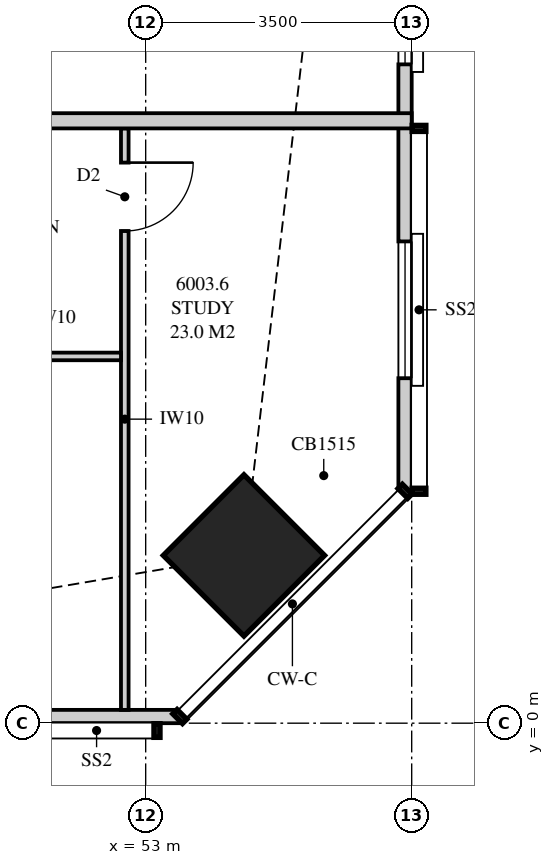
"""IFC4 building model, lengths in metres.
Left out: names, types, materials, properties, quantities, classifications, styles, units other than length and angle.
Written with IfcOpenShell. Run it as: python <this file> out.ifc"""

import sys

from ifc_helpers import new_model, si_unit, direction, frame, frame_2d, origin, origin_2d, place, context, subcontext, project, spatial, polyline, rectangle, hollow_rectangle, outline, extrude, element, fill, save


model = new_model("IFC4")
c1 = context("Model", 3, precision=1e-05, world=origin(), true_north=direction((0.0, 1.0)))
c2 = subcontext(c1, "Body", "Model", "MODEL_VIEW")
j1 = project(units=[si_unit("LENGTHUNIT", "METRE"), si_unit("PLANEANGLEUNIT", "RADIAN")], contexts=[c1])
p1 = place(None, origin())
s1 = spatial("IfcSite", under=j1, at=p1, CompositionType="ELEMENT")
p2 = place(p1, origin())
s2 = spatial("IfcBuilding", under=s1, at=p2, CompositionType="ELEMENT")
p3 = place(p2, frame((0.0, 0.0, 221.45)))
s3 = spatial("IfcBuildingStorey", under=s2, at=p3, CompositionType="ELEMENT", Elevation=221.45)
p4 = place(p3, frame((54.293, 2.207, 0.0), z_axis=(0.0, 0.0, 1.0), x_axis=(-0.707106781187, 0.707106781187, 0.0)))
e1 = element("IfcColumn", 1, at=p4, inside=s3, PredefinedType="COLUMN", context=c2, shape_type="SweptSolid", body=[
    extrude(hollow_rectangle(XDim=1.5, YDim=1.5, WallThickness=0.125, at=origin_2d()), origin(), (0.0, 0.0, 1.0), 3.5),
])
p5 = place(p3, frame((35.35, 0.087, 0.0), z_axis=(0.0, 0.0, 1.0), x_axis=(1.0, 0.0, 0.0)))
e2 = element("IfcWall", 2, at=p5, inside=s3, PredefinedType="SOLIDWALL", context=c2, shape_type="SweptSolid", body=[
    extrude(outline(polyline([(0.0, 0.0), (18.099, 0.0), (18.099, 3.26), (11.74, 3.26), (11.74, 2.3), (11.656, 2.3), (11.656, 3.26), (11.525, 3.26), (11.525, 2.3), (0.0, 2.3), (0.0, 0.0)])), frame((0.0, 0.087, 0.0), z_axis=(0.0, -1.0, 0.0), x_axis=(1.0, 0.0, 0.0)), (0.0, 0.0, 1.0), 0.175),
])
p6 = place(p5, frame((4.0, 0.0, 0.4)))
e3 = element("IfcOpeningElement", 3, at=p6, cuts=e2, PredefinedType="OPENING", context=c2, shape_type="SweptSolid", body=[
    extrude(rectangle(XDim=1.8, YDim=1.85, at=frame_2d((0.9, 0.925))), frame((0.0, 0.097, 0.0), z_axis=(0.0, -1.0, 0.0), x_axis=(1.0, 0.0, 0.0)), (0.0, 0.0, 1.0), 0.195),
])
p7 = place(p5, frame((7.6, 0.0, 0.4)))
e4 = element("IfcOpeningElement", 4, at=p7, cuts=e2, PredefinedType="OPENING", context=c2, shape_type="SweptSolid", body=[
    extrude(rectangle(XDim=1.8, YDim=1.85, at=frame_2d((0.9, 0.925))), frame((0.0, 0.097, 0.0), z_axis=(0.0, -1.0, 0.0), x_axis=(1.0, 0.0, 0.0)), (0.0, 0.0, 1.0), 0.195),
])
p8 = place(p5, frame((13.51, 0.0, 0.4)))
e5 = element("IfcOpeningElement", 5, at=p8, cuts=e2, PredefinedType="OPENING", context=c2, shape_type="SweptSolid", body=[
    extrude(rectangle(XDim=2.4, YDim=1.85, at=frame_2d((1.2, 0.925))), frame((0.0, 0.097, 0.0), z_axis=(0.0, -1.0, 0.0), x_axis=(1.0, 0.0, 0.0)), (0.0, 0.0, 1.0), 0.195),
])
p9 = place(p3, frame((56.413, 3.051, 0.0), z_axis=(0.0, 0.0, 1.0), x_axis=(0.0, 1.0, 0.0)))
e6 = element("IfcWall", 6, at=p9, inside=s3, PredefinedType="SOLIDWALL", context=c2, shape_type="SweptSolid", body=[
    extrude(outline(polyline([(0.0, 0.0), (14.249, 0.0), (14.249, 2.3), (9.949, 2.3), (9.949, 3.26), (9.858, 3.26), (9.858, 2.3), (9.688, 2.3), (9.688, 3.26), (0.0, 3.26), (0.0, 0.0)])), frame((0.0, 0.087, 0.0), z_axis=(0.0, -1.0, 0.0), x_axis=(1.0, 0.0, 0.0)), (0.0, 0.0, 1.0), 0.175),
])
p10 = place(p9, frame((1.487, 0.0, 0.4)))
e7 = element("IfcOpeningElement", 7, at=p10, cuts=e6, PredefinedType="OPENING", context=c2, shape_type="SweptSolid", body=[
    extrude(rectangle(XDim=1.8, YDim=1.85, at=frame_2d((0.9, 0.925))), frame((0.0, 0.097, 0.0), z_axis=(0.0, -1.0, 0.0), x_axis=(1.0, 0.0, 0.0)), (0.0, 0.0, 1.0), 0.195),
])
p11 = place(p9, frame((5.616, 0.0, 0.4)))
e8 = element("IfcOpeningElement", 8, at=p11, cuts=e6, PredefinedType="OPENING", context=c2, shape_type="SweptSolid", body=[
    extrude(rectangle(XDim=2.4, YDim=1.85, at=frame_2d((1.2, 0.925))), frame((0.0, 0.097, 0.0), z_axis=(0.0, -1.0, 0.0), x_axis=(1.0, 0.0, 0.0)), (0.0, 0.0, 1.0), 0.195),
])
p12 = place(p9, frame((11.875, 0.0, 0.4)))
e9 = element("IfcOpeningElement", 9, at=p12, cuts=e6, PredefinedType="OPENING", context=c2, shape_type="SweptSolid", body=[
    extrude(rectangle(XDim=1.8, YDim=1.85, at=frame_2d((0.9, 0.925))), frame((0.0, 0.097, 0.0), z_axis=(0.0, -1.0, 0.0), x_axis=(1.0, 0.0, 0.0)), (0.0, 0.0, 1.0), 0.195),
])
p13 = place(p3, frame((52.725, 0.175, 0.0), z_axis=(0.0, 0.0, 1.0), x_axis=(0.0, 1.0, 0.0)))
e10 = element("IfcWall", 10, at=p13, inside=s3, PredefinedType="PARTITIONING", context=c2, shape_type="SweptSolid", body=[
    extrude(outline(polyline([(0.0, 0.0), (7.65, 0.0), (7.65, 3.26), (2.639, 3.26), (2.639, 2.3), (0.894, 2.3), (0.894, 3.26), (0.0, 3.26), (0.0, 0.0)])), frame((0.0, 0.05, 0.0), z_axis=(0.0, -1.0, 0.0), x_axis=(1.0, 0.0, 0.0)), (0.0, 0.0, 1.0), 0.1),
])
p14 = place(p13, frame((6.3, 0.0, 0.0)))
e11 = element("IfcOpeningElement", 11, at=p14, cuts=e10, PredefinedType="OPENING", context=c2, shape_type="SweptSolid", body=[
    extrude(rectangle(XDim=0.9, YDim=2.1, at=frame_2d((0.45, 1.05))), frame((0.0, 0.06, 0.0), z_axis=(0.0, -1.0, 0.0), x_axis=(1.0, 0.0, 0.0)), (0.0, 0.0, 1.0), 0.12),
])
p15 = place(p3, frame((49.175, 4.825, 0.0), z_axis=(0.0, 0.0, 1.0), x_axis=(1.0, 0.0, 0.0)))
e12 = element("IfcWall", 12, at=p15, inside=s3, PredefinedType="PARTITIONING", context=c2, shape_type="SweptSolid", body=[
    extrude(rectangle(XDim=3.5, YDim=0.1, at=frame_2d((1.75, 0.0))), origin(), (0.0, 0.0, 1.0), 3.26),
])
p16 = place(p15, frame((1.3, 0.0, 0.0)))
e13 = element("IfcOpeningElement", 13, at=p16, cuts=e12, PredefinedType="OPENING", context=c2, shape_type="SweptSolid", body=[
    extrude(rectangle(XDim=0.9, YDim=2.1, at=frame_2d((0.45, 1.05))), frame((0.0, 0.06, 0.0), z_axis=(0.0, -1.0, 0.0), x_axis=(1.0, 0.0, 0.0)), (0.0, 0.0, 1.0), 0.12),
])
p17 = place(p3, frame((46.075, 7.925, 0.0), z_axis=(0.0, 0.0, 1.0), x_axis=(1.0, 0.0, 0.0)))
e14 = element("IfcWall", 14, at=p17, inside=s3, PredefinedType="PARTITIONING", context=c2, shape_type="SweptSolid", body=[
    extrude(outline(polyline([(0.0, 0.0), (10.425, 0.0), (10.425, 3.26), (9.8, 3.26), (9.8, 2.3), (7.968, 2.3), (7.968, 3.26), (2.11, 3.26), (2.11, 2.66), (0.0, 2.66), (0.0, 3.26), (0.0, 0.0)])), frame((0.0, 0.1, 0.0), z_axis=(0.0, -1.0, 0.0), x_axis=(1.0, 0.0, 0.0)), (0.0, 0.0, 1.0), 0.2),
])
p18 = place(p10, origin())
e15 = element("IfcWindow", 15, at=p18, inside=s3, PartitioningType="SINGLE_PANEL", PredefinedType="WINDOW", context=c2, shape_type="SweptSolid", body=[
    extrude(rectangle(XDim=1.8, YDim=1.85, at=frame_2d((0.9, 0.925))), frame((0.0, 0.03, 0.0), z_axis=(0.0, -1.0, 0.0), x_axis=(1.0, 0.0, 0.0)), (0.0, 0.0, 1.0), 0.06),
])
fill(e7, e15)
p19 = place(p11, origin())
e16 = element("IfcWindow", 16, at=p19, inside=s3, PartitioningType="SINGLE_PANEL", PredefinedType="WINDOW", context=c2, shape_type="SweptSolid", body=[
    extrude(rectangle(XDim=2.4, YDim=1.85, at=frame_2d((1.2, 0.925))), frame((0.0, 0.03, 0.0), z_axis=(0.0, -1.0, 0.0), x_axis=(1.0, 0.0, 0.0)), (0.0, 0.0, 1.0), 0.06),
])
fill(e8, e16)
p20 = place(p14, frame((0.9, 0.0, 0.0), z_axis=(0.0, 0.0, 1.0), x_axis=(-1.0, 0.0, 0.0)))
e17 = element("IfcDoor", 17, at=p20, inside=s3, OperationType="SINGLE_SWING_LEFT", PredefinedType="DOOR", context=c2, shape_type="SweptSolid", body=[
    extrude(rectangle(XDim=0.9, YDim=2.1, at=frame_2d((0.45, 1.05))), frame((0.0, 0.025, 0.0), z_axis=(0.0, -1.0, 0.0), x_axis=(1.0, 0.0, 0.0)), (0.0, 0.0, 1.0), 0.05),
])
fill(e11, e17)
save(model, sys.argv[1])
